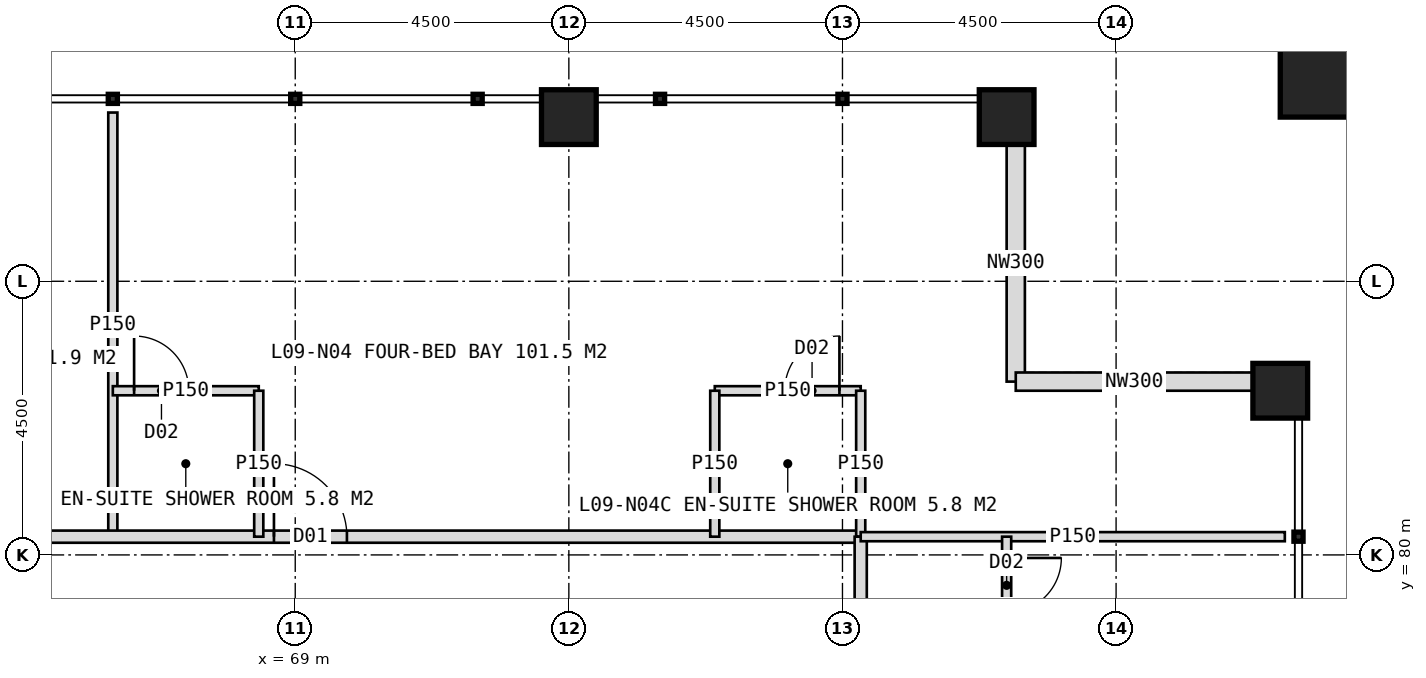
"""IFC4 building model, lengths in metres.
Left out: names, types, materials, properties, quantities, classifications, styles, units other than length and angle.
Written with IfcOpenShell. Run it as: python <this file> out.ifc"""

import sys

from ifc_helpers import new_model, si_unit, direction, frame, frame_2d, origin, origin_2d, place, context, subcontext, project, spatial, rectangle, hollow_rectangle, extrude, element, fill, save


model = new_model("IFC4")
c1 = context("Model", 3, precision=1e-05, world=origin(), true_north=direction((0.0, 1.0)))
c2 = subcontext(c1, "Body", "Model", "MODEL_VIEW")
j1 = project(units=[si_unit("LENGTHUNIT", "METRE"), si_unit("PLANEANGLEUNIT", "RADIAN")], contexts=[c1])
p1 = place(None, origin())
s1 = spatial("IfcSite", under=j1, at=p1, CompositionType="ELEMENT")
p2 = place(p1, origin())
s2 = spatial("IfcBuilding", under=s1, at=p2, CompositionType="ELEMENT")
p3 = place(p2, frame((0.0, 0.0, 43.0)))
s3 = spatial("IfcBuildingStorey", under=s2, at=p3, CompositionType="ELEMENT", Elevation=43.0)
for number, where, z_axis, x_axis in (
    (1, (73.5, 87.2, 0.0), (0.0, 0.0, 1.0), (1.0, 0.0, 0.0)),
    (2, (80.7, 87.2, 0.0), (0.0, 0.0, 1.0), (1.0, 0.0, 0.0)),
    (3, (85.2, 82.7, 0.0), (0.0, 0.0, 1.0), (1.0, 0.0, 0.0)),
):
    element("IfcColumn", number, at=place(p3, frame(where, z_axis=z_axis, x_axis=x_axis)), inside=s3, PredefinedType="COLUMN", context=c2, shape_type="SweptSolid", body=[
        extrude(hollow_rectangle(XDim=0.9, YDim=0.9, WallThickness=0.08, at=origin_2d()), origin(), (0.0, 0.0, 1.0), 4.0),
    ])
p4 = place(p3, frame((86.1, 88.1, 0.0), z_axis=(0.0, 0.0, 1.0), x_axis=(1.0, 0.0, 0.0)))
e4 = element("IfcColumn", 4, at=p4, inside=s3, PredefinedType="COLUMN", context=c2, shape_type="SweptSolid", body=[
    extrude(hollow_rectangle(XDim=1.8, YDim=1.8, WallThickness=0.1, at=origin_2d()), origin(), (0.0, 0.0, 1.0), 4.0),
])
for number, where, z_axis, x_axis in (
    (5, (80.85, 86.75, 0.0), (0.0, 0.0, 1.0), (0.0, -1.0, 0.0)),
    (6, (80.85, 82.85, 0.0), (0.0, 0.0, 1.0), (1.0, 0.0, 0.0)),
):
    element("IfcWall", number, at=place(p3, frame(where, z_axis=z_axis, x_axis=x_axis)), inside=s3, PredefinedType="ELEMENTEDWALL", context=c2, shape_type="SweptSolid", body=[
        extrude(rectangle(XDim=3.9, YDim=0.3, at=frame_2d((1.95, 0.0))), origin(), (0.0, 0.0, 1.0), 2.95),
    ])
p5 = place(p3, frame((66.0, 80.3, 0.0), z_axis=(0.0, 0.0, 1.0), x_axis=(0.0, 1.0, 0.0)))
e7 = element("IfcWall", 7, at=p5, inside=s3, PredefinedType="PARTITIONING", context=c2, shape_type="SweptSolid", body=[
    extrude(rectangle(XDim=6.975, YDim=0.15, at=frame_2d((3.487, 0.0))), origin(), (0.0, 0.0, 1.0), 3.75),
])
p6 = place(p3, frame((41.7, 80.3, 0.0), z_axis=(0.0, 0.0, 1.0), x_axis=(1.0, 0.0, 0.0)))
e8 = element("IfcWall", 8, at=p6, inside=s3, PredefinedType="PARTITIONING", context=c2, shape_type="SweptSolid", body=[
    extrude(rectangle(XDim=36.6, YDim=0.2, at=frame_2d((18.3, 0.0))), origin(), (0.0, 0.0, 1.0), 3.75),
])
p7 = place(p6, frame((2.65, 0.0, 0.0)))
e9 = element("IfcOpeningElement", 9, at=p7, cuts=e8, PredefinedType="OPENING", context=c2, shape_type="SweptSolid", body=[
    extrude(rectangle(XDim=1.2, YDim=2.2, at=frame_2d((0.6, 1.1))), frame((0.0, 0.11, 0.0), z_axis=(0.0, -1.0, 0.0), x_axis=(1.0, 0.0, 0.0)), (0.0, 0.0, 1.0), 0.22),
])
p8 = place(p6, frame((11.95, 0.0, 0.0)))
e10 = element("IfcOpeningElement", 10, at=p8, cuts=e8, PredefinedType="OPENING", context=c2, shape_type="SweptSolid", body=[
    extrude(rectangle(XDim=1.2, YDim=2.2, at=frame_2d((0.6, 1.1))), frame((0.0, 0.11, 0.0), z_axis=(0.0, -1.0, 0.0), x_axis=(1.0, 0.0, 0.0)), (0.0, 0.0, 1.0), 0.22),
])
p9 = place(p6, frame((20.8, 0.0, 0.0)))
e11 = element("IfcOpeningElement", 11, at=p9, cuts=e8, PredefinedType="OPENING", context=c2, shape_type="SweptSolid", body=[
    extrude(rectangle(XDim=1.0, YDim=2.1, at=frame_2d((0.5, 1.05))), frame((0.0, 0.11, 0.0), z_axis=(0.0, -1.0, 0.0), x_axis=(1.0, 0.0, 0.0)), (0.0, 0.0, 1.0), 0.22),
])
p10 = place(p6, frame((26.95, 0.0, 0.0)))
e12 = element("IfcOpeningElement", 12, at=p10, cuts=e8, PredefinedType="OPENING", context=c2, shape_type="SweptSolid", body=[
    extrude(rectangle(XDim=1.2, YDim=2.2, at=frame_2d((0.6, 1.1))), frame((0.0, 0.11, 0.0), z_axis=(0.0, -1.0, 0.0), x_axis=(1.0, 0.0, 0.0)), (0.0, 0.0, 1.0), 0.22),
])
p11 = place(p3, frame((66.0, 82.7, 0.0), z_axis=(0.0, 0.0, 1.0), x_axis=(1.0, 0.0, 0.0)))
e13 = element("IfcWall", 13, at=p11, inside=s3, PredefinedType="PARTITIONING", context=c2, shape_type="SweptSolid", body=[
    extrude(rectangle(XDim=2.4, YDim=0.15, at=frame_2d((1.2, 0.0))), origin(), (0.0, 0.0, 1.0), 3.75),
])
p12 = place(p11, frame((0.35, 0.0, 0.0)))
e14 = element("IfcOpeningElement", 14, at=p12, cuts=e13, PredefinedType="OPENING", context=c2, shape_type="SweptSolid", body=[
    extrude(rectangle(XDim=0.9, YDim=2.1, at=frame_2d((0.45, 1.05))), frame((0.0, 0.085, 0.0), z_axis=(0.0, -1.0, 0.0), x_axis=(1.0, 0.0, 0.0)), (0.0, 0.0, 1.0), 0.17),
])
p13 = place(p3, frame((68.4, 80.3, 0.0), z_axis=(0.0, 0.0, 1.0), x_axis=(0.0, 1.0, 0.0)))
e15 = element("IfcWall", 15, at=p13, inside=s3, PredefinedType="PARTITIONING", context=c2, shape_type="SweptSolid", body=[
    extrude(rectangle(XDim=2.4, YDim=0.15, at=frame_2d((1.2, 0.0))), origin(), (0.0, 0.0, 1.0), 3.75),
])
p14 = place(p3, frame((75.9, 82.7, 0.0), z_axis=(0.0, 0.0, 1.0), x_axis=(1.0, 0.0, 0.0)))
e16 = element("IfcWall", 16, at=p14, inside=s3, PredefinedType="PARTITIONING", context=c2, shape_type="SweptSolid", body=[
    extrude(rectangle(XDim=2.4, YDim=0.15, at=frame_2d((1.2, 0.0))), origin(), (0.0, 0.0, 1.0), 2.95),
])
p15 = place(p14, frame((1.15, 0.0, 0.0)))
e17 = element("IfcOpeningElement", 17, at=p15, cuts=e16, PredefinedType="OPENING", context=c2, shape_type="SweptSolid", body=[
    extrude(rectangle(XDim=0.9, YDim=2.1, at=frame_2d((0.45, 1.05))), frame((0.0, 0.085, 0.0), z_axis=(0.0, -1.0, 0.0), x_axis=(1.0, 0.0, 0.0)), (0.0, 0.0, 1.0), 0.17),
])
for number, where, z_axis, x_axis in (
    (18, (75.9, 80.3, 0.0), (0.0, 0.0, 1.0), (0.0, 1.0, 0.0)),
    (19, (78.3, 80.3, 0.0), (0.0, 0.0, 1.0), (0.0, 1.0, 0.0)),
):
    element("IfcWall", number, at=place(p3, frame(where, z_axis=z_axis, x_axis=x_axis)), inside=s3, PredefinedType="PARTITIONING", context=c2, shape_type="SweptSolid", body=[
        extrude(rectangle(XDim=2.4, YDim=0.15, at=frame_2d((1.2, 0.0))), origin(), (0.0, 0.0, 1.0), 3.75),
    ])
p16 = place(p3, frame((78.3, 80.3, 0.0), z_axis=(0.0, 0.0, 1.0), x_axis=(0.0, -1.0, 0.0)))
e20 = element("IfcWall", 20, at=p16, inside=s3, PredefinedType="PARTITIONING", context=c2, shape_type="SweptSolid", body=[
    extrude(rectangle(XDim=36.6, YDim=0.2, at=frame_2d((18.3, 0.0))), origin(), (0.0, 0.0, 1.0), 3.75),
])
p17 = place(p16, frame((2.65, 0.0, 0.0)))
e21 = element("IfcOpeningElement", 21, at=p17, cuts=e20, PredefinedType="OPENING", context=c2, shape_type="SweptSolid", body=[
    extrude(rectangle(XDim=1.2, YDim=2.2, at=frame_2d((0.6, 1.1))), frame((0.0, 0.11, 0.0), z_axis=(0.0, -1.0, 0.0), x_axis=(1.0, 0.0, 0.0)), (0.0, 0.0, 1.0), 0.22),
])
p18 = place(p16, frame((11.95, 0.0, 0.0)))
e22 = element("IfcOpeningElement", 22, at=p18, cuts=e20, PredefinedType="OPENING", context=c2, shape_type="SweptSolid", body=[
    extrude(rectangle(XDim=1.2, YDim=2.2, at=frame_2d((0.6, 1.1))), frame((0.0, 0.11, 0.0), z_axis=(0.0, -1.0, 0.0), x_axis=(1.0, 0.0, 0.0)), (0.0, 0.0, 1.0), 0.22),
])
p19 = place(p16, frame((20.95, 0.0, 0.0)))
e23 = element("IfcOpeningElement", 23, at=p19, cuts=e20, PredefinedType="OPENING", context=c2, shape_type="SweptSolid", body=[
    extrude(rectangle(XDim=1.2, YDim=2.2, at=frame_2d((0.6, 1.1))), frame((0.0, 0.11, 0.0), z_axis=(0.0, -1.0, 0.0), x_axis=(1.0, 0.0, 0.0)), (0.0, 0.0, 1.0), 0.22),
])
p20 = place(p16, frame((29.95, 0.0, 0.0)))
e24 = element("IfcOpeningElement", 24, at=p20, cuts=e20, PredefinedType="OPENING", context=c2, shape_type="SweptSolid", body=[
    extrude(rectangle(XDim=1.2, YDim=2.2, at=frame_2d((0.6, 1.1))), frame((0.0, 0.11, 0.0), z_axis=(0.0, -1.0, 0.0), x_axis=(1.0, 0.0, 0.0)), (0.0, 0.0, 1.0), 0.22),
])
p21 = place(p3, frame((78.3, 80.3, 0.0), z_axis=(0.0, 0.0, 1.0), x_axis=(1.0, 0.0, 0.0)))
e25 = element("IfcWall", 25, at=p21, inside=s3, PredefinedType="PARTITIONING", context=c2, shape_type="SweptSolid", body=[
    extrude(rectangle(XDim=6.975, YDim=0.15, at=frame_2d((3.487, 0.0))), origin(), (0.0, 0.0, 1.0), 3.75),
])
p22 = place(p3, frame((80.7, 80.3, 0.0), z_axis=(0.0, 0.0, 1.0), x_axis=(0.0, -1.0, 0.0)))
e26 = element("IfcWall", 26, at=p22, inside=s3, PredefinedType="PARTITIONING", context=c2, shape_type="SweptSolid", body=[
    extrude(rectangle(XDim=2.4, YDim=0.15, at=frame_2d((1.2, 0.0))), origin(), (0.0, 0.0, 1.0), 2.95),
])
p23 = place(p22, frame((0.35, 0.0, 0.0)))
e27 = element("IfcOpeningElement", 27, at=p23, cuts=e26, PredefinedType="OPENING", context=c2, shape_type="SweptSolid", body=[
    extrude(rectangle(XDim=0.9, YDim=2.1, at=frame_2d((0.45, 1.05))), frame((0.0, 0.085, 0.0), z_axis=(0.0, -1.0, 0.0), x_axis=(1.0, 0.0, 0.0)), (0.0, 0.0, 1.0), 0.17),
])
p24 = place(p10, origin())
e28 = element("IfcDoor", 28, at=p24, inside=s3, OperationType="SINGLE_SWING_LEFT", PredefinedType="DOOR", context=c2, shape_type="SweptSolid", body=[
    extrude(rectangle(XDim=1.2, YDim=2.2, at=frame_2d((0.6, 1.1))), frame((0.0, 0.025, 0.0), z_axis=(0.0, -1.0, 0.0), x_axis=(1.0, 0.0, 0.0)), (0.0, 0.0, 1.0), 0.05),
])
fill(e12, e28)
p25 = place(p12, origin())
e29 = element("IfcDoor", 29, at=p25, inside=s3, OperationType="SINGLE_SWING_LEFT", PredefinedType="DOOR", context=c2, shape_type="SweptSolid", body=[
    extrude(rectangle(XDim=0.9, YDim=2.1, at=frame_2d((0.45, 1.05))), frame((0.0, 0.025, 0.0), z_axis=(0.0, -1.0, 0.0), x_axis=(1.0, 0.0, 0.0)), (0.0, 0.0, 1.0), 0.05),
])
fill(e14, e29)
p26 = place(p15, origin())
e30 = element("IfcDoor", 30, at=p26, inside=s3, OperationType="SINGLE_SWING_RIGHT", PredefinedType="DOOR", context=c2, shape_type="SweptSolid", body=[
    extrude(rectangle(XDim=0.9, YDim=2.1, at=frame_2d((0.45, 1.05))), frame((0.0, 0.025, 0.0), z_axis=(0.0, -1.0, 0.0), x_axis=(1.0, 0.0, 0.0)), (0.0, 0.0, 1.0), 0.05),
])
fill(e17, e30)
p27 = place(p23, origin())
e31 = element("IfcDoor", 31, at=p27, inside=s3, OperationType="SINGLE_SWING_LEFT", PredefinedType="DOOR", context=c2, shape_type="SweptSolid", body=[
    extrude(rectangle(XDim=0.9, YDim=2.1, at=frame_2d((0.45, 1.05))), frame((0.0, 0.025, 0.0), z_axis=(0.0, -1.0, 0.0), x_axis=(1.0, 0.0, 0.0)), (0.0, 0.0, 1.0), 0.05),
])
fill(e27, e31)
save(model, sys.argv[1])
